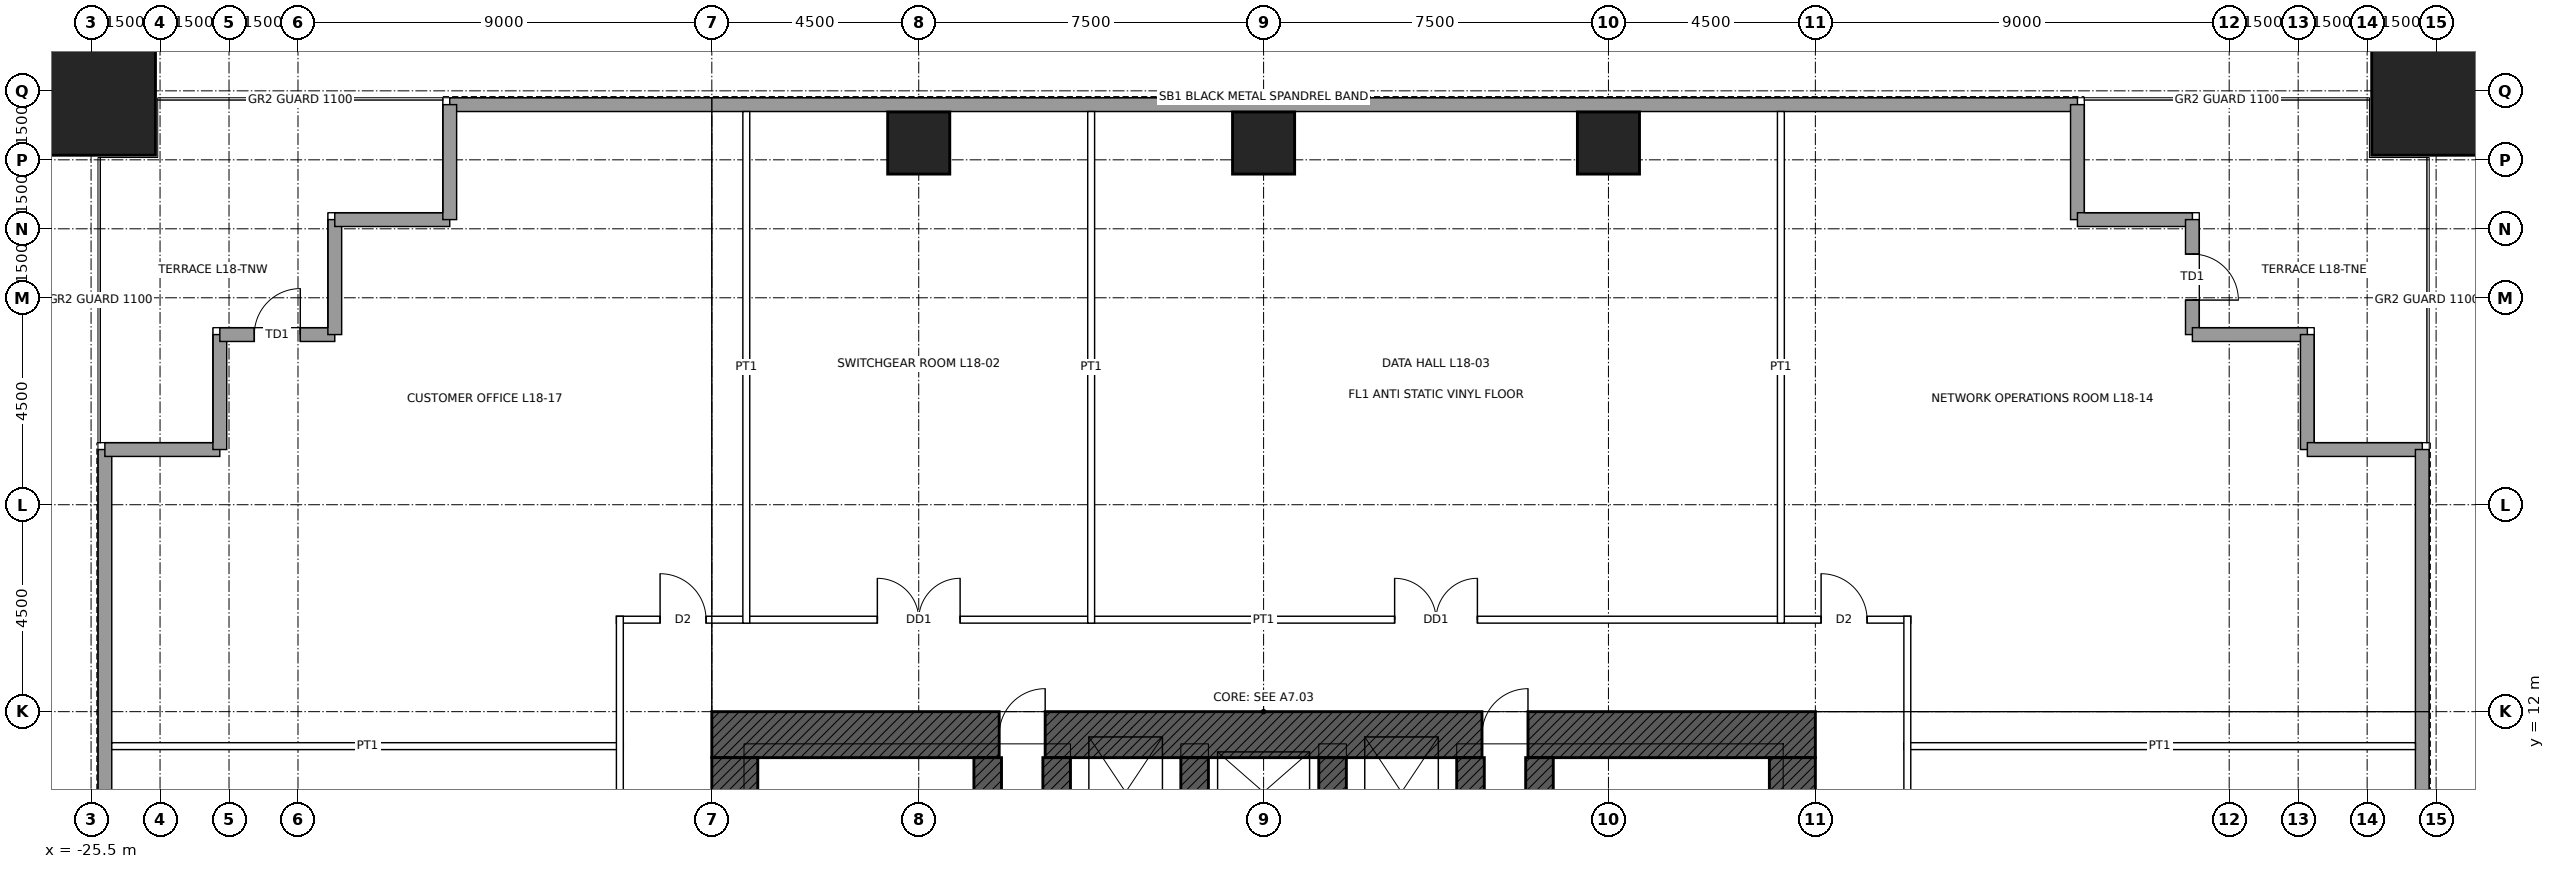
"""IFC4 building model, lengths in metres.
Left out: names, types, materials, properties, quantities, classifications, styles, units other than length and angle.
Written with IfcOpenShell. Run it as: python <this file> out.ifc"""

import sys

from ifc_helpers import new_model, si_unit, direction, frame, frame_2d, origin, origin_2d, place, context, subcontext, project, spatial, rectangle, hollow_rectangle, extrude, element, fill, save


model = new_model("IFC4")
c1 = context("Model", 3, precision=1e-05, world=origin(), true_north=direction((0.0, 1.0)))
c2 = subcontext(c1, "Body", "Model", "MODEL_VIEW")
j1 = project(units=[si_unit("LENGTHUNIT", "METRE"), si_unit("PLANEANGLEUNIT", "RADIAN")], contexts=[c1])
p1 = place(None, origin())
s1 = spatial("IfcSite", under=j1, at=p1, CompositionType="ELEMENT")
p2 = place(p1, origin())
s2 = spatial("IfcBuilding", under=s1, at=p2, CompositionType="ELEMENT")
p3 = place(p2, frame((0.0, 0.0, 93.4)))
s3 = spatial("IfcBuildingStorey", under=s2, at=p3, CompositionType="ELEMENT", Elevation=93.4)
for number, where, z_axis, x_axis in (
    (1, (25.5, 25.5, 0.0), (0.0, 0.0, 1.0), (1.0, 0.0, 0.0)),
    (2, (-25.5, 25.5, 0.0), (0.0, 0.0, 1.0), (1.0, 0.0, 0.0)),
):
    element("IfcColumn", number, at=place(p3, frame(where, z_axis=z_axis, x_axis=x_axis)), inside=s3, PredefinedType="COLUMN", context=c2, shape_type="SweptSolid", body=[
        extrude(hollow_rectangle(XDim=2.8, YDim=2.8, WallThickness=0.14, at=origin_2d()), origin(), (0.0, 0.0, 1.0), 5.0),
    ])
for number, where, z_axis, x_axis in (
    (3, (-7.5, 24.365, 0.0), (0.0, 0.0, 1.0), (1.0, 0.0, 0.0)),
    (4, (0.0, 24.365, 0.0), (0.0, 0.0, 1.0), (1.0, 0.0, 0.0)),
    (5, (7.5, 24.365, 0.0), (0.0, 0.0, 1.0), (1.0, 0.0, 0.0)),
):
    element("IfcColumn", number, at=place(p3, frame(where, z_axis=z_axis, x_axis=x_axis)), inside=s3, PredefinedType="COLUMN", context=c2, shape_type="SweptSolid", body=[
        extrude(hollow_rectangle(XDim=1.35, YDim=1.35, WallThickness=0.1, at=origin_2d()), origin(), (0.0, 0.0, 1.0), 5.0),
    ])
p4 = place(p3, frame((-12.0, 11.5, 0.0), z_axis=(0.0, 0.0, 1.0), x_axis=(1.0, 0.0, 0.0)))
e6 = element("IfcWall", 6, at=p4, inside=s3, PredefinedType="SHEAR", context=c2, shape_type="SweptSolid", body=[
    extrude(rectangle(XDim=24.0, YDim=1.0, at=frame_2d((12.0, 0.0))), origin(), (0.0, 0.0, 1.0), 5.0),
])
p5 = place(p4, frame((6.25, 0.0, 0.0)))
e7 = element("IfcOpeningElement", 7, at=p5, cuts=e6, PredefinedType="OPENING", context=c2, shape_type="SweptSolid", body=[
    extrude(rectangle(XDim=1.0, YDim=2.4, at=frame_2d((0.5, 1.2))), frame((0.0, 0.51, 0.0), z_axis=(0.0, -1.0, 0.0), x_axis=(1.0, 0.0, 0.0)), (0.0, 0.0, 1.0), 1.02),
])
p6 = place(p4, frame((16.75, 0.0, 0.0)))
e8 = element("IfcOpeningElement", 8, at=p6, cuts=e6, PredefinedType="OPENING", context=c2, shape_type="SweptSolid", body=[
    extrude(rectangle(XDim=1.0, YDim=2.4, at=frame_2d((0.5, 1.2))), frame((0.0, 0.51, 0.0), z_axis=(0.0, -1.0, 0.0), x_axis=(1.0, 0.0, 0.0)), (0.0, 0.0, 1.0), 1.02),
])
p7 = place(p3, frame((11.5, 11.0, 0.0), z_axis=(0.0, 0.0, 1.0), x_axis=(0.0, -1.0, 0.0)))
e9 = element("IfcWall", 9, at=p7, inside=s3, PredefinedType="SHEAR", context=c2, shape_type="SweptSolid", body=[
    extrude(rectangle(XDim=22.0, YDim=1.0, at=frame_2d((11.0, 0.0))), origin(), (0.0, 0.0, 1.0), 5.0),
])
p8 = place(p7, frame((10.5, 0.0, 0.0)))
e10 = element("IfcOpeningElement", 10, at=p8, cuts=e9, PredefinedType="OPENING", context=c2, shape_type="SweptSolid", body=[
    extrude(rectangle(XDim=1.0, YDim=2.4, at=frame_2d((0.5, 1.2))), frame((0.0, 0.51, 0.0), z_axis=(0.0, -1.0, 0.0), x_axis=(1.0, 0.0, 0.0)), (0.0, 0.0, 1.0), 1.02),
])
p9 = place(p3, frame((-11.5, -11.0, 0.0), z_axis=(0.0, 0.0, 1.0), x_axis=(0.0, 1.0, 0.0)))
e11 = element("IfcWall", 11, at=p9, inside=s3, PredefinedType="SHEAR", context=c2, shape_type="SweptSolid", body=[
    extrude(rectangle(XDim=22.0, YDim=1.0, at=frame_2d((11.0, 0.0))), origin(), (0.0, 0.0, 1.0), 5.0),
])
p10 = place(p9, frame((10.5, 0.0, 0.0)))
e12 = element("IfcOpeningElement", 12, at=p10, cuts=e11, PredefinedType="OPENING", context=c2, shape_type="SweptSolid", body=[
    extrude(rectangle(XDim=1.0, YDim=2.4, at=frame_2d((0.5, 1.2))), frame((0.0, 0.51, 0.0), z_axis=(0.0, -1.0, 0.0), x_axis=(1.0, 0.0, 0.0)), (0.0, 0.0, 1.0), 1.02),
])
p11 = place(p3, frame((-6.0, 4.5, 0.0), z_axis=(0.0, 0.0, 1.0), x_axis=(0.0, 1.0, 0.0)))
e13 = element("IfcWall", 13, at=p11, inside=s3, PredefinedType="SHEAR", context=c2, shape_type="SweptSolid", body=[
    extrude(rectangle(XDim=6.5, YDim=0.6, at=frame_2d((3.25, 0.0))), origin(), (0.0, 0.0, 1.0), 5.0),
])
p12 = place(p11, frame((0.6, 0.0, 0.0)))
e14 = element("IfcOpeningElement", 14, at=p12, cuts=e13, PredefinedType="OPENING", context=c2, shape_type="SweptSolid", body=[
    extrude(rectangle(XDim=1.0, YDim=2.1, at=frame_2d((0.5, 1.05))), frame((0.0, 0.31, 0.0), z_axis=(0.0, -1.0, 0.0), x_axis=(1.0, 0.0, 0.0)), (0.0, 0.0, 1.0), 0.62),
])
p13 = place(p3, frame((6.0, 4.5, 0.0), z_axis=(0.0, 0.0, 1.0), x_axis=(0.0, 1.0, 0.0)))
e15 = element("IfcWall", 15, at=p13, inside=s3, PredefinedType="SHEAR", context=c2, shape_type="SweptSolid", body=[
    extrude(rectangle(XDim=6.5, YDim=0.6, at=frame_2d((3.25, 0.0))), origin(), (0.0, 0.0, 1.0), 5.0),
])
p14 = place(p13, frame((0.6, 0.0, 0.0)))
e16 = element("IfcOpeningElement", 16, at=p14, cuts=e15, PredefinedType="OPENING", context=c2, shape_type="SweptSolid", body=[
    extrude(rectangle(XDim=1.0, YDim=2.1, at=frame_2d((0.5, 1.05))), frame((0.0, 0.31, 0.0), z_axis=(0.0, -1.0, 0.0), x_axis=(1.0, 0.0, 0.0)), (0.0, 0.0, 1.0), 0.62),
])
for number, where, z_axis, x_axis in (
    (17, (-4.5, 8.5, 0.0), (0.0, 0.0, 1.0), (0.0, 1.0, 0.0)),
    (18, (4.5, 8.5, 0.0), (0.0, 0.0, 1.0), (0.0, 1.0, 0.0)),
    (19, (-1.5, 8.5, 0.0), (0.0, 0.0, 1.0), (0.0, 1.0, 0.0)),
    (20, (1.5, 8.5, 0.0), (0.0, 0.0, 1.0), (0.0, 1.0, 0.0)),
):
    element("IfcWall", number, at=place(p3, frame(where, z_axis=z_axis, x_axis=x_axis)), inside=s3, PredefinedType="SHEAR", context=c2, shape_type="SweptSolid", body=[
        extrude(rectangle(XDim=2.5, YDim=0.6, at=frame_2d((1.25, 0.0))), origin(), (0.0, 0.0, 1.0), 5.0),
    ])
p15 = place(p3, frame((-17.7, 25.2, 0.0), z_axis=(0.0, 0.0, 1.0), x_axis=(1.0, 0.0, 0.0)))
e21 = element("IfcWall", 21, at=p15, inside=s3, PredefinedType="SOLIDWALL", context=c2, shape_type="SweptSolid", body=[
    extrude(rectangle(XDim=35.4, YDim=0.3, at=frame_2d((17.7, 0.0))), origin(), (0.0, 0.0, 1.0), 4.75),
])
for number, where, z_axis, x_axis in (
    (22, (17.7, 25.2, 0.0), (0.0, 0.0, 1.0), (0.0, -1.0, 0.0)),
    (23, (17.7, 22.7, 0.0), (0.0, 0.0, 1.0), (1.0, 0.0, 0.0)),
):
    element("IfcWall", number, at=place(p3, frame(where, z_axis=z_axis, x_axis=x_axis)), inside=s3, PredefinedType="SOLIDWALL", context=c2, shape_type="SweptSolid", body=[
        extrude(rectangle(XDim=2.5, YDim=0.3, at=frame_2d((1.25, 0.0))), origin(), (0.0, 0.0, 1.0), 4.75),
    ])
p16 = place(p3, frame((20.2, 22.7, 0.0), z_axis=(0.0, 0.0, 1.0), x_axis=(0.0, -1.0, 0.0)))
e24 = element("IfcWall", 24, at=p16, inside=s3, PredefinedType="SOLIDWALL", context=c2, shape_type="SweptSolid", body=[
    extrude(rectangle(XDim=2.5, YDim=0.3, at=frame_2d((1.25, 0.0))), origin(), (0.0, 0.0, 1.0), 4.75),
])
p17 = place(p16, frame((0.75, 0.0, 0.0)))
e25 = element("IfcOpeningElement", 25, at=p17, cuts=e24, PredefinedType="OPENING", context=c2, shape_type="SweptSolid", body=[
    extrude(rectangle(XDim=1.0, YDim=2.4, at=frame_2d((0.5, 1.2))), frame((0.0, 0.16, 0.0), z_axis=(0.0, -1.0, 0.0), x_axis=(1.0, 0.0, 0.0)), (0.0, 0.0, 1.0), 0.32),
])
for number, where, z_axis, x_axis in (
    (26, (20.2, 20.2, 0.0), (0.0, 0.0, 1.0), (1.0, 0.0, 0.0)),
    (27, (22.7, 20.2, 0.0), (0.0, 0.0, 1.0), (0.0, -1.0, 0.0)),
    (28, (22.7, 17.7, 0.0), (0.0, 0.0, 1.0), (1.0, 0.0, 0.0)),
):
    element("IfcWall", number, at=place(p3, frame(where, z_axis=z_axis, x_axis=x_axis)), inside=s3, PredefinedType="SOLIDWALL", context=c2, shape_type="SweptSolid", body=[
        extrude(rectangle(XDim=2.5, YDim=0.3, at=frame_2d((1.25, 0.0))), origin(), (0.0, 0.0, 1.0), 4.75),
    ])
for number, where, z_axis, x_axis in (
    (29, (25.2, 17.7, 0.0), (0.0, 0.0, 1.0), (0.0, -1.0, 0.0)),
    (30, (-25.2, -17.7, 0.0), (0.0, 0.0, 1.0), (0.0, 1.0, 0.0)),
):
    element("IfcWall", number, at=place(p3, frame(where, z_axis=z_axis, x_axis=x_axis)), inside=s3, PredefinedType="SOLIDWALL", context=c2, shape_type="SweptSolid", body=[
        extrude(rectangle(XDim=35.4, YDim=0.3, at=frame_2d((17.7, 0.0))), origin(), (0.0, 0.0, 1.0), 4.75),
    ])
for number, where, z_axis, x_axis in (
    (31, (-25.2, 17.7, 0.0), (0.0, 0.0, 1.0), (1.0, 0.0, 0.0)),
    (32, (-22.7, 17.7, 0.0), (0.0, 0.0, 1.0), (0.0, 1.0, 0.0)),
):
    element("IfcWall", number, at=place(p3, frame(where, z_axis=z_axis, x_axis=x_axis)), inside=s3, PredefinedType="SOLIDWALL", context=c2, shape_type="SweptSolid", body=[
        extrude(rectangle(XDim=2.5, YDim=0.3, at=frame_2d((1.25, 0.0))), origin(), (0.0, 0.0, 1.0), 4.75),
    ])
p18 = place(p3, frame((-22.7, 20.2, 0.0), z_axis=(0.0, 0.0, 1.0), x_axis=(1.0, 0.0, 0.0)))
e33 = element("IfcWall", 33, at=p18, inside=s3, PredefinedType="SOLIDWALL", context=c2, shape_type="SweptSolid", body=[
    extrude(rectangle(XDim=2.5, YDim=0.3, at=frame_2d((1.25, 0.0))), origin(), (0.0, 0.0, 1.0), 4.75),
])
p19 = place(p18, frame((0.75, 0.0, 0.0)))
e34 = element("IfcOpeningElement", 34, at=p19, cuts=e33, PredefinedType="OPENING", context=c2, shape_type="SweptSolid", body=[
    extrude(rectangle(XDim=1.0, YDim=2.4, at=frame_2d((0.5, 1.2))), frame((0.0, 0.16, 0.0), z_axis=(0.0, -1.0, 0.0), x_axis=(1.0, 0.0, 0.0)), (0.0, 0.0, 1.0), 0.32),
])
for number, where, z_axis, x_axis in (
    (35, (-20.2, 20.2, 0.0), (0.0, 0.0, 1.0), (0.0, 1.0, 0.0)),
    (36, (-20.2, 22.7, 0.0), (0.0, 0.0, 1.0), (1.0, 0.0, 0.0)),
    (37, (-17.7, 22.7, 0.0), (0.0, 0.0, 1.0), (0.0, 1.0, 0.0)),
):
    element("IfcWall", number, at=place(p3, frame(where, z_axis=z_axis, x_axis=x_axis)), inside=s3, PredefinedType="SOLIDWALL", context=c2, shape_type="SweptSolid", body=[
        extrude(rectangle(XDim=2.5, YDim=0.3, at=frame_2d((1.25, 0.0))), origin(), (0.0, 0.0, 1.0), 4.75),
    ])
for number, where, z_axis, x_axis in (
    (38, (-25.05, 11.25, 0.0), (0.0, 0.0, 1.0), (1.0, 0.0, 0.0)),
    (39, (13.925, 11.25, 0.0), (0.0, 0.0, 1.0), (1.0, 0.0, 0.0)),
):
    element("IfcWall", number, at=place(p3, frame(where, z_axis=z_axis, x_axis=x_axis)), inside=s3, PredefinedType="PARTITIONING", context=c2, shape_type="SweptSolid", body=[
        extrude(rectangle(XDim=11.125, YDim=0.15, at=frame_2d((5.562, 0.0))), origin(), (0.0, 0.0, 1.0), 3.823),
    ])
p20 = place(p3, frame((-14.075, 14.0, 0.0), z_axis=(0.0, 0.0, 1.0), x_axis=(1.0, 0.0, 0.0)))
e40 = element("IfcWall", 40, at=p20, inside=s3, PredefinedType="PARTITIONING", context=c2, shape_type="SweptSolid", body=[
    extrude(rectangle(XDim=28.15, YDim=0.15, at=frame_2d((14.075, 0.0))), origin(), (0.0, 0.0, 1.0), 4.75),
])
p21 = place(p20, frame((5.675, 0.0, 0.0)))
e41 = element("IfcOpeningElement", 41, at=p21, cuts=e40, PredefinedType="OPENING", context=c2, shape_type="SweptSolid", body=[
    extrude(rectangle(XDim=1.8, YDim=2.4, at=frame_2d((0.9, 1.2))), frame((0.0, 0.085, 0.0), z_axis=(0.0, -1.0, 0.0), x_axis=(1.0, 0.0, 0.0)), (0.0, 0.0, 1.0), 0.17),
])
p22 = place(p20, frame((16.925, 0.0, 0.0)))
e42 = element("IfcOpeningElement", 42, at=p22, cuts=e40, PredefinedType="OPENING", context=c2, shape_type="SweptSolid", body=[
    extrude(rectangle(XDim=1.8, YDim=2.4, at=frame_2d((0.9, 1.2))), frame((0.0, 0.085, 0.0), z_axis=(0.0, -1.0, 0.0), x_axis=(1.0, 0.0, 0.0)), (0.0, 0.0, 1.0), 0.17),
])
p23 = place(p20, frame((26.2, 0.0, 0.0)))
e43 = element("IfcOpeningElement", 43, at=p23, cuts=e40, PredefinedType="OPENING", context=c2, shape_type="SweptSolid", body=[
    extrude(rectangle(XDim=1.0, YDim=2.1, at=frame_2d((0.5, 1.05))), frame((0.0, 0.085, 0.0), z_axis=(0.0, -1.0, 0.0), x_axis=(1.0, 0.0, 0.0)), (0.0, 0.0, 1.0), 0.17),
])
p24 = place(p20, frame((0.95, 0.0, 0.0)))
e44 = element("IfcOpeningElement", 44, at=p24, cuts=e40, PredefinedType="OPENING", context=c2, shape_type="SweptSolid", body=[
    extrude(rectangle(XDim=1.0, YDim=2.1, at=frame_2d((0.5, 1.05))), frame((0.0, 0.085, 0.0), z_axis=(0.0, -1.0, 0.0), x_axis=(1.0, 0.0, 0.0)), (0.0, 0.0, 1.0), 0.17),
])
p25 = place(p3, frame((-14.0, -14.075, 0.0), z_axis=(0.0, 0.0, 1.0), x_axis=(0.0, 1.0, 0.0)))
e45 = element("IfcWall", 45, at=p25, inside=s3, PredefinedType="PARTITIONING", context=c2, shape_type="SweptSolid", body=[
    extrude(rectangle(XDim=28.15, YDim=0.15, at=frame_2d((14.075, 0.0))), origin(), (0.0, 0.0, 1.0), 4.75),
])
p26 = place(p25, frame((5.05, 0.0, 0.0)))
e46 = element("IfcOpeningElement", 46, at=p26, cuts=e45, PredefinedType="OPENING", context=c2, shape_type="SweptSolid", body=[
    extrude(rectangle(XDim=1.8, YDim=2.4, at=frame_2d((0.9, 1.2))), frame((0.0, 0.085, 0.0), z_axis=(0.0, -1.0, 0.0), x_axis=(1.0, 0.0, 0.0)), (0.0, 0.0, 1.0), 0.17),
])
p27 = place(p25, frame((10.45, 0.0, 0.0)))
e47 = element("IfcOpeningElement", 47, at=p27, cuts=e45, PredefinedType="OPENING", context=c2, shape_type="SweptSolid", body=[
    extrude(rectangle(XDim=1.0, YDim=2.1, at=frame_2d((0.5, 1.05))), frame((0.0, 0.085, 0.0), z_axis=(0.0, -1.0, 0.0), x_axis=(1.0, 0.0, 0.0)), (0.0, 0.0, 1.0), 0.17),
])
p28 = place(p25, frame((15.465, 0.0, 0.0)))
e48 = element("IfcOpeningElement", 48, at=p28, cuts=e45, PredefinedType="OPENING", context=c2, shape_type="SweptSolid", body=[
    extrude(rectangle(XDim=1.0, YDim=2.1, at=frame_2d((0.5, 1.05))), frame((0.0, 0.085, 0.0), z_axis=(0.0, -1.0, 0.0), x_axis=(1.0, 0.0, 0.0)), (0.0, 0.0, 1.0), 0.17),
])
p29 = place(p25, frame((21.075, 0.0, 0.0)))
e49 = element("IfcOpeningElement", 49, at=p29, cuts=e45, PredefinedType="OPENING", context=c2, shape_type="SweptSolid", body=[
    extrude(rectangle(XDim=1.0, YDim=2.1, at=frame_2d((0.5, 1.05))), frame((0.0, 0.085, 0.0), z_axis=(0.0, -1.0, 0.0), x_axis=(1.0, 0.0, 0.0)), (0.0, 0.0, 1.0), 0.17),
])
for number, where, z_axis, x_axis in (
    (50, (-11.25, 13.925, 0.0), (0.0, 0.0, 1.0), (0.0, 1.0, 0.0)),
    (51, (-3.75, 13.925, 0.0), (0.0, 0.0, 1.0), (0.0, 1.0, 0.0)),
    (52, (11.25, 13.925, 0.0), (0.0, 0.0, 1.0), (0.0, 1.0, 0.0)),
):
    element("IfcWall", number, at=place(p3, frame(where, z_axis=z_axis, x_axis=x_axis)), inside=s3, PredefinedType="PARTITIONING", context=c2, shape_type="SweptSolid", body=[
        extrude(rectangle(XDim=11.125, YDim=0.15, at=frame_2d((5.562, 0.0))), origin(), (0.0, 0.0, 1.0), 3.823),
    ])
p30 = place(p3, frame((14.0, -14.075, 0.0), z_axis=(0.0, 0.0, 1.0), x_axis=(0.0, 1.0, 0.0)))
e53 = element("IfcWall", 53, at=p30, inside=s3, PredefinedType="PARTITIONING", context=c2, shape_type="SweptSolid", body=[
    extrude(rectangle(XDim=28.15, YDim=0.15, at=frame_2d((14.075, 0.0))), origin(), (0.0, 0.0, 1.0), 4.75),
])
p31 = place(p30, frame((16.3, 0.0, 0.0)))
e54 = element("IfcOpeningElement", 54, at=p31, cuts=e53, PredefinedType="OPENING", context=c2, shape_type="SweptSolid", body=[
    extrude(rectangle(XDim=1.8, YDim=2.4, at=frame_2d((0.9, 1.2))), frame((0.0, 0.085, 0.0), z_axis=(0.0, -1.0, 0.0), x_axis=(1.0, 0.0, 0.0)), (0.0, 0.0, 1.0), 0.17),
])
p32 = place(p30, frame((5.45, 0.0, 0.0)))
e55 = element("IfcOpeningElement", 55, at=p32, cuts=e53, PredefinedType="OPENING", context=c2, shape_type="SweptSolid", body=[
    extrude(rectangle(XDim=1.0, YDim=2.1, at=frame_2d((0.5, 1.05))), frame((0.0, 0.085, 0.0), z_axis=(0.0, -1.0, 0.0), x_axis=(1.0, 0.0, 0.0)), (0.0, 0.0, 1.0), 0.17),
])
p33 = place(p17, origin())
e56 = element("IfcDoor", 56, at=p33, inside=s3, OperationType="SINGLE_SWING_RIGHT", PredefinedType="DOOR", context=c2, shape_type="SweptSolid", body=[
    extrude(rectangle(XDim=1.0, YDim=2.4, at=frame_2d((0.5, 1.2))), frame((0.0, 0.025, 0.0), z_axis=(0.0, -1.0, 0.0), x_axis=(1.0, 0.0, 0.0)), (0.0, 0.0, 1.0), 0.05),
])
fill(e25, e56)
p34 = place(p19, origin())
e57 = element("IfcDoor", 57, at=p34, inside=s3, OperationType="SINGLE_SWING_RIGHT", PredefinedType="DOOR", context=c2, shape_type="SweptSolid", body=[
    extrude(rectangle(XDim=1.0, YDim=2.4, at=frame_2d((0.5, 1.2))), frame((0.0, 0.025, 0.0), z_axis=(0.0, -1.0, 0.0), x_axis=(1.0, 0.0, 0.0)), (0.0, 0.0, 1.0), 0.05),
])
fill(e34, e57)
p35 = place(p5, origin())
e58 = element("IfcDoor", 58, at=p35, inside=s3, OperationType="SINGLE_SWING_RIGHT", PredefinedType="DOOR", context=c2, shape_type="SweptSolid", body=[
    extrude(rectangle(XDim=1.0, YDim=2.4, at=frame_2d((0.5, 1.2))), frame((0.0, 0.485, 0.0), z_axis=(0.0, -1.0, 0.0), x_axis=(1.0, 0.0, 0.0)), (0.0, 0.0, 1.0), 0.05),
])
fill(e7, e58)
p36 = place(p6, origin())
e59 = element("IfcDoor", 59, at=p36, inside=s3, OperationType="SINGLE_SWING_RIGHT", PredefinedType="DOOR", context=c2, shape_type="SweptSolid", body=[
    extrude(rectangle(XDim=1.0, YDim=2.4, at=frame_2d((0.5, 1.2))), frame((0.0, 0.485, 0.0), z_axis=(0.0, -1.0, 0.0), x_axis=(1.0, 0.0, 0.0)), (0.0, 0.0, 1.0), 0.05),
])
fill(e8, e59)
p37 = place(p21, origin())
e60 = element("IfcDoor", 60, at=p37, inside=s3, OperationType="DOUBLE_DOOR_SINGLE_SWING", PredefinedType="DOOR", context=c2, shape_type="SweptSolid", body=[
    extrude(rectangle(XDim=1.8, YDim=2.4, at=frame_2d((0.9, 1.2))), frame((0.0, 0.025, 0.0), z_axis=(0.0, -1.0, 0.0), x_axis=(1.0, 0.0, 0.0)), (0.0, 0.0, 1.0), 0.05),
])
fill(e41, e60)
p38 = place(p22, origin())
e61 = element("IfcDoor", 61, at=p38, inside=s3, OperationType="DOUBLE_DOOR_SINGLE_SWING", PredefinedType="DOOR", context=c2, shape_type="SweptSolid", body=[
    extrude(rectangle(XDim=1.8, YDim=2.4, at=frame_2d((0.9, 1.2))), frame((0.0, 0.025, 0.0), z_axis=(0.0, -1.0, 0.0), x_axis=(1.0, 0.0, 0.0)), (0.0, 0.0, 1.0), 0.05),
])
fill(e42, e61)
p39 = place(p23, origin())
e62 = element("IfcDoor", 62, at=p39, inside=s3, OperationType="SINGLE_SWING_LEFT", PredefinedType="DOOR", context=c2, shape_type="SweptSolid", body=[
    extrude(rectangle(XDim=1.0, YDim=2.1, at=frame_2d((0.5, 1.05))), frame((0.0, 0.025, 0.0), z_axis=(0.0, -1.0, 0.0), x_axis=(1.0, 0.0, 0.0)), (0.0, 0.0, 1.0), 0.05),
])
fill(e43, e62)
p40 = place(p24, origin())
e63 = element("IfcDoor", 63, at=p40, inside=s3, OperationType="SINGLE_SWING_LEFT", PredefinedType="DOOR", context=c2, shape_type="SweptSolid", body=[
    extrude(rectangle(XDim=1.0, YDim=2.1, at=frame_2d((0.5, 1.05))), frame((0.0, 0.025, 0.0), z_axis=(0.0, -1.0, 0.0), x_axis=(1.0, 0.0, 0.0)), (0.0, 0.0, 1.0), 0.05),
])
fill(e44, e63)
save(model, sys.argv[1])
